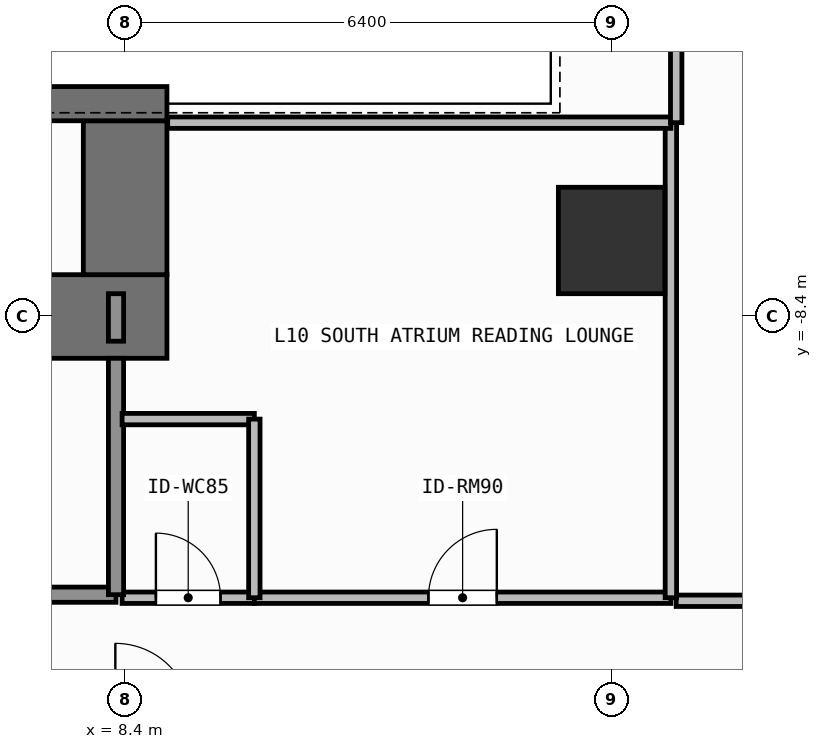
"""IFC4 building model, lengths in metres.
Left out: names, types, materials, properties, quantities, classifications, styles, units other than length and angle.
Written with IfcOpenShell. Run it as: python <this file> out.ifc"""

import sys

from ifc_helpers import new_model, si_unit, direction, frame, frame_2d, origin, origin_2d, place, context, subcontext, project, spatial, rectangle, extrude, element, fill, save


model = new_model("IFC4")
c1 = context("Model", 3, precision=1e-05, world=origin(), true_north=direction((0.0, 1.0)))
c2 = subcontext(c1, "Body", "Model", "MODEL_VIEW")
j1 = project(units=[si_unit("LENGTHUNIT", "METRE"), si_unit("PLANEANGLEUNIT", "RADIAN")], contexts=[c1])
p1 = place(None, origin())
s1 = spatial("IfcSite", under=j1, at=p1, CompositionType="ELEMENT")
p2 = place(p1, origin())
s2 = spatial("IfcBuilding", under=s1, at=p2, CompositionType="ELEMENT")
p3 = place(p2, frame((0.0, 0.0, 38.4)))
s3 = spatial("IfcBuildingStorey", under=s2, at=p3, CompositionType="ELEMENT", Elevation=38.4)
p4 = place(p3, frame((6.12, -8.4, 0.0), z_axis=(0.0, 0.0, 1.0), x_axis=(1.0, 0.0, 0.0)))
e1 = element("IfcWall", 1, at=p4, inside=s3, PredefinedType="SHEAR", context=c2, shape_type="SweptSolid", body=[
    extrude(rectangle(XDim=2.83, YDim=1.1, at=frame_2d((1.415, 0.0))), origin(), (0.0, 0.0, 1.0), 3.9),
])
p5 = place(p3, frame((8.4, -7.85, 0.0), z_axis=(0.0, 0.0, 1.0), x_axis=(0.0, 1.0, 0.0)))
e2 = element("IfcWall", 2, at=p5, inside=s3, PredefinedType="SHEAR", context=c2, shape_type="SweptSolid", body=[
    extrude(rectangle(XDim=2.025, YDim=1.1, at=frame_2d((1.013, 0.0))), origin(), (0.0, 0.0, 1.0), 3.9),
])
p6 = place(p3, frame((3.045, -5.6, 0.0), z_axis=(0.0, 0.0, 1.0), x_axis=(1.0, 0.0, 0.0)))
e3 = element("IfcWall", 3, at=p6, inside=s3, PredefinedType="SHEAR", context=c2, shape_type="SweptSolid", body=[
    extrude(rectangle(XDim=5.905, YDim=0.45, at=frame_2d((2.953, 0.0))), origin(), (0.0, 0.0, 1.0), 3.9),
])
p7 = place(p3, frame((14.8, -7.4, 0.0), z_axis=(0.0, 0.0, 1.0), x_axis=(1.0, 0.0, 0.0)))
e4 = element("IfcColumn", 4, at=p7, inside=s3, PredefinedType="COLUMN", context=c2, shape_type="SweptSolid", body=[
    extrude(rectangle(XDim=1.4, YDim=1.4, at=origin_2d()), origin(), (0.0, 0.0, 1.0), 3.9),
])
p8 = place(p3, frame((4.58, -12.06, 0.0), z_axis=(0.0, 0.0, 1.0), x_axis=(1.0, 0.0, 0.0)))
e5 = element("IfcWall", 5, at=p8, inside=s3, PredefinedType="SOLIDWALL", context=c2, shape_type="SweptSolid", body=[
    extrude(rectangle(XDim=3.7, YDim=0.2, at=frame_2d((1.85, 0.0))), origin(), (0.0, 0.0, 1.0), 3.68),
])
p9 = place(p8, frame((1.212, 0.0, 0.0)))
e6 = element("IfcOpeningElement", 6, at=p9, cuts=e5, PredefinedType="OPENING", context=c2, shape_type="SweptSolid", body=[
    extrude(rectangle(XDim=1.1, YDim=2.15, at=frame_2d((0.55, 1.075))), frame((0.0, 0.11, 0.0), z_axis=(0.0, -1.0, 0.0), x_axis=(1.0, 0.0, 0.0)), (0.0, 0.0, 1.0), 0.22),
])
p10 = place(p3, frame((8.36, -12.1, 0.0), z_axis=(0.0, 0.0, 1.0), x_axis=(1.0, 0.0, 0.0)))
e7 = element("IfcWall", 7, at=p10, inside=s3, PredefinedType="PARTITIONING", context=c2, shape_type="SweptSolid", body=[
    extrude(rectangle(XDim=1.74, YDim=0.15, at=frame_2d((0.87, 0.0))), origin(), (0.0, 0.0, 1.0), 3.68),
])
p11 = place(p10, frame((0.445, 0.0, 0.0)))
e8 = element("IfcOpeningElement", 8, at=p11, cuts=e7, PredefinedType="OPENING", context=c2, shape_type="SweptSolid", body=[
    extrude(rectangle(XDim=0.85, YDim=2.1, at=frame_2d((0.425, 1.05))), frame((0.0, 0.085, 0.0), z_axis=(0.0, -1.0, 0.0), x_axis=(1.0, 0.0, 0.0)), (0.0, 0.0, 1.0), 0.17),
])
p12 = place(p3, frame((10.1, -12.1, 0.0), z_axis=(0.0, 0.0, 1.0), x_axis=(1.0, 0.0, 0.0)))
e9 = element("IfcWall", 9, at=p12, inside=s3, PredefinedType="PARTITIONING", context=c2, shape_type="SweptSolid", body=[
    extrude(rectangle(XDim=5.48, YDim=0.15, at=frame_2d((2.74, 0.0))), origin(), (0.0, 0.0, 1.0), 3.68),
])
p13 = place(p12, frame((2.29, 0.0, 0.0)))
e10 = element("IfcOpeningElement", 10, at=p13, cuts=e9, PredefinedType="OPENING", context=c2, shape_type="SweptSolid", body=[
    extrude(rectangle(XDim=0.9, YDim=2.1, at=frame_2d((0.45, 1.05))), frame((0.0, 0.085, 0.0), z_axis=(0.0, -1.0, 0.0), x_axis=(1.0, 0.0, 0.0)), (0.0, 0.0, 1.0), 0.17),
])
p14 = place(p3, frame((15.65, -12.14, 0.0), z_axis=(0.0, 0.0, 1.0), x_axis=(1.0, 0.0, 0.0)))
e11 = element("IfcWall", 11, at=p14, inside=s3, PredefinedType="PARTITIONING", context=c2, shape_type="SweptSolid", body=[
    extrude(rectangle(XDim=12.27, YDim=0.15, at=frame_2d((6.135, 0.0))), origin(), (0.0, 0.0, 1.0), 3.68),
])
p15 = place(p14, frame((5.15, 0.0, 0.0)))
e12 = element("IfcOpeningElement", 12, at=p15, cuts=e11, PredefinedType="OPENING", context=c2, shape_type="SweptSolid", body=[
    extrude(rectangle(XDim=0.9, YDim=2.1, at=frame_2d((0.45, 1.05))), frame((0.0, 0.085, 0.0), z_axis=(0.0, -1.0, 0.0), x_axis=(1.0, 0.0, 0.0)), (0.0, 0.0, 1.0), 0.17),
])
p16 = place(p3, frame((8.28, -12.06, 0.0), z_axis=(0.0, 0.0, 1.0), x_axis=(0.0, 1.0, 0.0)))
e13 = element("IfcWall", 13, at=p16, inside=s3, PredefinedType="SOLIDWALL", context=c2, shape_type="SweptSolid", body=[
    extrude(rectangle(XDim=3.11, YDim=0.2, at=frame_2d((1.555, 0.0))), origin(), (0.0, 0.0, 1.0), 3.68),
])
p17 = place(p3, frame((8.28, -8.725, 0.0), z_axis=(0.0, 0.0, 1.0), x_axis=(0.0, 1.0, 0.0)))
e14 = element("IfcWall", 14, at=p17, inside=s3, PredefinedType="SOLIDWALL", context=c2, shape_type="SweptSolid", body=[
    extrude(rectangle(XDim=0.625, YDim=0.2, at=frame_2d((0.312, 0.0))), origin(), (0.0, 0.0, 1.0), 3.68),
])
p18 = place(p3, frame((8.36, -9.75, 0.0), z_axis=(0.0, 0.0, 1.0), x_axis=(1.0, 0.0, 0.0)))
e15 = element("IfcWall", 15, at=p18, inside=s3, PredefinedType="PARTITIONING", context=c2, shape_type="SweptSolid", body=[
    extrude(rectangle(XDim=1.74, YDim=0.15, at=frame_2d((0.87, 0.0))), origin(), (0.0, 0.0, 1.0), 3.68),
])
p19 = place(p3, frame((10.1, -12.1, 0.0), z_axis=(0.0, 0.0, 1.0), x_axis=(0.0, 1.0, 0.0)))
e16 = element("IfcWall", 16, at=p19, inside=s3, PredefinedType="PARTITIONING", context=c2, shape_type="SweptSolid", body=[
    extrude(rectangle(XDim=2.35, YDim=0.15, at=frame_2d((1.175, 0.0))), origin(), (0.0, 0.0, 1.0), 3.68),
])
p20 = place(p3, frame((15.58, -12.1, 0.0), z_axis=(0.0, 0.0, 1.0), x_axis=(0.0, 1.0, 0.0)))
e17 = element("IfcWall", 17, at=p20, inside=s3, PredefinedType="PARTITIONING", context=c2, shape_type="SweptSolid", body=[
    extrude(rectangle(XDim=6.25, YDim=0.15, at=frame_2d((3.125, 0.0))), origin(), (0.0, 0.0, 1.0), 3.68),
])
p21 = place(p3, frame((8.96, -5.85, 0.0), z_axis=(0.0, 0.0, 1.0), x_axis=(1.0, 0.0, 0.0)))
e18 = element("IfcWall", 18, at=p21, inside=s3, PredefinedType="PARTITIONING", context=c2, shape_type="SweptSolid", body=[
    extrude(rectangle(XDim=6.62, YDim=0.15, at=frame_2d((3.31, 0.0))), origin(), (0.0, 0.0, 1.0), 3.68),
])
p22 = place(p3, frame((15.65, -5.85, 0.0), z_axis=(0.0, 0.0, 1.0), x_axis=(0.0, 1.0, 0.0)))
e19 = element("IfcWall", 19, at=p22, inside=s3, PredefinedType="PARTITIONING", context=c2, shape_type="SweptSolid", body=[
    extrude(rectangle(XDim=4.05, YDim=0.15, at=frame_2d((2.025, 0.0))), origin(), (0.0, 0.0, 1.0), 3.68),
])
p23 = place(p11, origin())
e20 = element("IfcDoor", 20, at=p23, inside=s3, OperationType="SINGLE_SWING_LEFT", PredefinedType="DOOR", context=c2, shape_type="SweptSolid", body=[
    extrude(rectangle(XDim=0.85, YDim=2.1, at=frame_2d((0.425, 1.05))), frame((0.0, 0.025, 0.0), z_axis=(0.0, -1.0, 0.0), x_axis=(1.0, 0.0, 0.0)), (0.0, 0.0, 1.0), 0.05),
])
fill(e8, e20)
p24 = place(p13, origin())
e21 = element("IfcDoor", 21, at=p24, inside=s3, OperationType="SINGLE_SWING_RIGHT", PredefinedType="DOOR", context=c2, shape_type="SweptSolid", body=[
    extrude(rectangle(XDim=0.9, YDim=2.1, at=frame_2d((0.45, 1.05))), frame((0.0, 0.025, 0.0), z_axis=(0.0, -1.0, 0.0), x_axis=(1.0, 0.0, 0.0)), (0.0, 0.0, 1.0), 0.05),
])
fill(e10, e21)
save(model, sys.argv[1])
